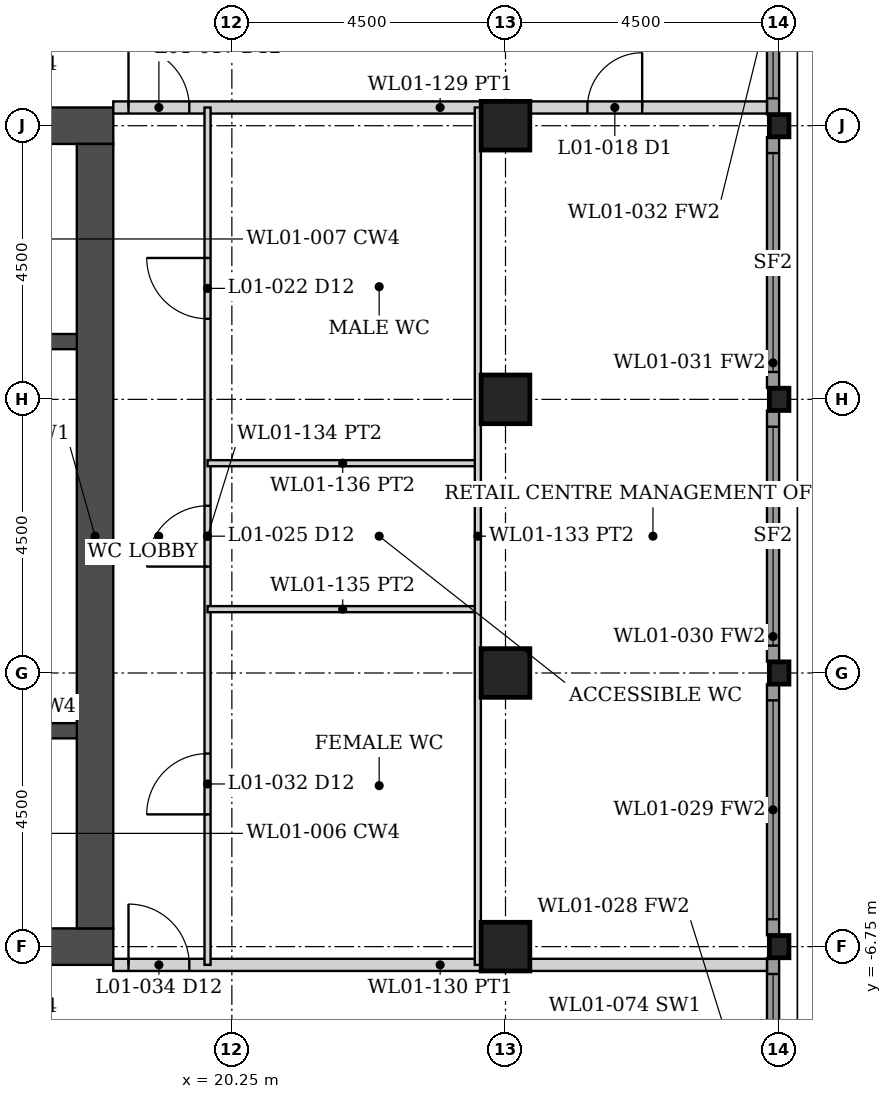
"""IFC4 building model, lengths in metres.
Left out: names, types, materials, properties, quantities, classifications, styles, units other than length and angle.
Written with IfcOpenShell. Run it as: python <this file> out.ifc"""

import sys

from ifc_helpers import new_model, si_unit, direction, frame, frame_2d, origin, origin_2d, place, context, subcontext, project, spatial, rectangle, hollow_rectangle, i_section, extrude, element, fill, save


model = new_model("IFC4")
c1 = context("Model", 3, precision=1e-05, world=origin(), true_north=direction((0.0, 1.0)))
c2 = subcontext(c1, "Body", "Model", "MODEL_VIEW")
j1 = project(units=[si_unit("LENGTHUNIT", "METRE"), si_unit("PLANEANGLEUNIT", "RADIAN")], contexts=[c1])
p1 = place(None, origin())
s1 = spatial("IfcSite", under=j1, at=p1, CompositionType="ELEMENT")
p2 = place(p1, origin())
s2 = spatial("IfcBuilding", under=s1, at=p2, CompositionType="ELEMENT")
p3 = place(p2, frame((0.0, 0.0, 6.0)))
s3 = spatial("IfcBuildingStorey", under=s2, at=p3, CompositionType="ELEMENT", Elevation=6.0)
for number, where, z_axis, x_axis in (
    (1, (24.75, -6.75, 0.0), (0.0, 0.0, 1.0), (1.0, 0.0, 0.0)),
    (2, (24.75, -2.25, 0.0), (0.0, 0.0, 1.0), (1.0, 0.0, 0.0)),
    (3, (24.75, 2.25, 0.0), (0.0, 0.0, 1.0), (1.0, 0.0, 0.0)),
    (4, (24.75, 6.75, 0.0), (0.0, 0.0, 1.0), (1.0, 0.0, 0.0)),
):
    element("IfcColumn", number, at=place(p3, frame(where, z_axis=z_axis, x_axis=x_axis)), inside=s3, PredefinedType="COLUMN", context=c2, shape_type="SweptSolid", body=[
        extrude(hollow_rectangle(XDim=0.8, YDim=0.8, WallThickness=0.08, at=origin_2d()), origin(), (0.0, 0.0, 1.0), 5.0),
    ])
for number, where, z_axis, x_axis in (
    (5, (29.25, -6.75, 0.0), (0.0, 0.0, 1.0), (1.0, 0.0, 0.0)),
    (6, (29.25, -2.25, 0.0), (0.0, 0.0, 1.0), (1.0, 0.0, 0.0)),
    (7, (29.25, 2.25, 0.0), (0.0, 0.0, 1.0), (1.0, 0.0, 0.0)),
    (8, (29.25, 6.75, 0.0), (0.0, 0.0, 1.0), (1.0, 0.0, 0.0)),
):
    element("IfcColumn", number, at=place(p3, frame(where, z_axis=z_axis, x_axis=x_axis)), inside=s3, PredefinedType="COLUMN", context=c2, shape_type="SweptSolid", body=[
        extrude(i_section(OverallWidth=0.322, OverallDepth=0.365, WebThickness=0.027, FlangeThickness=0.044, FilletRadius=0.015, at=origin_2d()), origin(), (0.0, 0.0, 1.0), 5.0),
    ])
for number, where, z_axis, x_axis in (
    (9, (8.7, -6.75, 0.0), (0.0, 0.0, 1.0), (1.0, 0.0, 0.0)),
    (10, (8.7, 6.75, 0.0), (0.0, 0.0, 1.0), (1.0, 0.0, 0.0)),
):
    element("IfcWall", number, at=place(p3, frame(where, z_axis=z_axis, x_axis=x_axis)), inside=s3, PredefinedType="SHEAR", context=c2, shape_type="SweptSolid", body=[
        extrude(rectangle(XDim=9.6, YDim=0.6, at=frame_2d((4.8, 0.0))), origin(), (0.0, 0.0, 1.0), 5.0),
    ])
p4 = place(p3, frame((18.0, -6.45, 0.0), z_axis=(0.0, 0.0, 1.0), x_axis=(0.0, 1.0, 0.0)))
e11 = element("IfcWall", 11, at=p4, inside=s3, PredefinedType="SHEAR", context=c2, shape_type="SweptSolid", body=[
    extrude(rectangle(XDim=12.9, YDim=0.6, at=frame_2d((6.45, 0.0))), origin(), (0.0, 0.0, 1.0), 5.0),
])
p5 = place(p3, frame((9.3, -3.2, 0.0), z_axis=(0.0, 0.0, 1.0), x_axis=(1.0, 0.0, 0.0)))
e12 = element("IfcWall", 12, at=p5, inside=s3, PredefinedType="SHEAR", context=c2, shape_type="SweptSolid", body=[
    extrude(rectangle(XDim=8.4, YDim=0.25, at=frame_2d((4.2, 0.0))), origin(), (0.0, 0.0, 1.0), 5.0),
])
p6 = place(p5, frame((0.15, 0.0, 0.0)))
e13 = element("IfcOpeningElement", 13, at=p6, cuts=e12, PredefinedType="OPENING", context=c2, shape_type="SweptSolid", body=[
    extrude(rectangle(XDim=1.0, YDim=2.1, at=frame_2d((0.5, 1.05))), frame((0.0, 0.135, 0.0), z_axis=(0.0, -1.0, 0.0), x_axis=(1.0, 0.0, 0.0)), (0.0, 0.0, 1.0), 0.27),
])
p7 = place(p3, frame((9.3, 3.2, 0.0), z_axis=(0.0, 0.0, 1.0), x_axis=(1.0, 0.0, 0.0)))
e14 = element("IfcWall", 14, at=p7, inside=s3, PredefinedType="SHEAR", context=c2, shape_type="SweptSolid", body=[
    extrude(rectangle(XDim=8.4, YDim=0.25, at=frame_2d((4.2, 0.0))), origin(), (0.0, 0.0, 1.0), 5.0),
])
p8 = place(p3, frame((29.15, -11.062, 0.0), z_axis=(0.0, 0.0, 1.0), x_axis=(0.0, 1.0, 0.0)))
e15 = element("IfcWall", 15, at=p8, inside=s3, PredefinedType="SOLIDWALL", context=c2, shape_type="SweptSolid", body=[
    extrude(rectangle(XDim=4.125, YDim=0.2, at=frame_2d((2.062, 0.0))), origin(), (0.0, 0.0, 1.0), 4.133),
])
p9 = place(p8, frame((0.262, 0.0, 0.15)))
e16 = element("IfcOpeningElement", 16, at=p9, cuts=e15, PredefinedType="OPENING", context=c2, shape_type="SweptSolid", body=[
    extrude(rectangle(XDim=3.6, YDim=3.833, at=frame_2d((1.8, 1.917))), frame((0.0, 0.11, 0.0), z_axis=(0.0, -1.0, 0.0), x_axis=(1.0, 0.0, 0.0)), (0.0, 0.0, 1.0), 0.22),
])
p10 = place(p3, frame((29.15, -6.562, 0.0), z_axis=(0.0, 0.0, 1.0), x_axis=(0.0, 1.0, 0.0)))
e17 = element("IfcWall", 17, at=p10, inside=s3, PredefinedType="SOLIDWALL", context=c2, shape_type="SweptSolid", body=[
    extrude(rectangle(XDim=4.125, YDim=0.2, at=frame_2d((2.062, 0.0))), origin(), (0.0, 0.0, 1.0), 4.133),
])
p11 = place(p10, frame((0.262, 0.0, 0.15)))
e18 = element("IfcOpeningElement", 18, at=p11, cuts=e17, PredefinedType="OPENING", context=c2, shape_type="SweptSolid", body=[
    extrude(rectangle(XDim=3.6, YDim=3.833, at=frame_2d((1.8, 1.917))), frame((0.0, 0.11, 0.0), z_axis=(0.0, -1.0, 0.0), x_axis=(1.0, 0.0, 0.0)), (0.0, 0.0, 1.0), 0.22),
])
p12 = place(p3, frame((29.15, -2.062, 0.0), z_axis=(0.0, 0.0, 1.0), x_axis=(0.0, 1.0, 0.0)))
e19 = element("IfcWall", 19, at=p12, inside=s3, PredefinedType="SOLIDWALL", context=c2, shape_type="SweptSolid", body=[
    extrude(rectangle(XDim=4.125, YDim=0.2, at=frame_2d((2.062, 0.0))), origin(), (0.0, 0.0, 1.0), 4.133),
])
p13 = place(p12, frame((0.262, 0.0, 0.15)))
e20 = element("IfcOpeningElement", 20, at=p13, cuts=e19, PredefinedType="OPENING", context=c2, shape_type="SweptSolid", body=[
    extrude(rectangle(XDim=3.6, YDim=3.833, at=frame_2d((1.8, 1.917))), frame((0.0, 0.11, 0.0), z_axis=(0.0, -1.0, 0.0), x_axis=(1.0, 0.0, 0.0)), (0.0, 0.0, 1.0), 0.22),
])
p14 = place(p3, frame((29.15, 2.438, 0.0), z_axis=(0.0, 0.0, 1.0), x_axis=(0.0, 1.0, 0.0)))
e21 = element("IfcWall", 21, at=p14, inside=s3, PredefinedType="SOLIDWALL", context=c2, shape_type="SweptSolid", body=[
    extrude(rectangle(XDim=4.125, YDim=0.2, at=frame_2d((2.062, 0.0))), origin(), (0.0, 0.0, 1.0), 4.133),
])
p15 = place(p14, frame((0.262, 0.0, 0.15)))
e22 = element("IfcOpeningElement", 22, at=p15, cuts=e21, PredefinedType="OPENING", context=c2, shape_type="SweptSolid", body=[
    extrude(rectangle(XDim=3.6, YDim=3.833, at=frame_2d((1.8, 1.917))), frame((0.0, 0.11, 0.0), z_axis=(0.0, -1.0, 0.0), x_axis=(1.0, 0.0, 0.0)), (0.0, 0.0, 1.0), 0.22),
])
p16 = place(p3, frame((29.15, 6.938, 0.0), z_axis=(0.0, 0.0, 1.0), x_axis=(0.0, 1.0, 0.0)))
e23 = element("IfcWall", 23, at=p16, inside=s3, PredefinedType="SOLIDWALL", context=c2, shape_type="SweptSolid", body=[
    extrude(rectangle(XDim=4.125, YDim=0.2, at=frame_2d((2.062, 0.0))), origin(), (0.0, 0.0, 1.0), 4.133),
])
p17 = place(p16, frame((0.262, 0.0, 0.15)))
e24 = element("IfcOpeningElement", 24, at=p17, cuts=e23, PredefinedType="OPENING", context=c2, shape_type="SweptSolid", body=[
    extrude(rectangle(XDim=3.6, YDim=3.833, at=frame_2d((1.8, 1.917))), frame((0.0, 0.11, 0.0), z_axis=(0.0, -1.0, 0.0), x_axis=(1.0, 0.0, 0.0)), (0.0, 0.0, 1.0), 0.22),
])
p18 = place(p3, frame((18.3, 7.05, 0.0), z_axis=(0.0, 0.0, 1.0), x_axis=(1.0, 0.0, 0.0)))
e25 = element("IfcWall", 25, at=p18, inside=s3, PredefinedType="PARTITIONING", context=c2, shape_type="SweptSolid", body=[
    extrude(rectangle(XDim=10.75, YDim=0.2, at=frame_2d((5.375, 0.0))), origin(), (0.0, 0.0, 1.0), 3.829),
])
p19 = place(p18, frame((7.798, 0.0, 0.0)))
e26 = element("IfcOpeningElement", 26, at=p19, cuts=e25, PredefinedType="OPENING", context=c2, shape_type="SweptSolid", body=[
    extrude(rectangle(XDim=0.9, YDim=2.1, at=frame_2d((0.45, 1.05))), frame((0.0, 0.11, 0.0), z_axis=(0.0, -1.0, 0.0), x_axis=(1.0, 0.0, 0.0)), (0.0, 0.0, 1.0), 0.22),
])
p20 = place(p18, frame((0.25, 0.0, 0.0)))
e27 = element("IfcOpeningElement", 27, at=p20, cuts=e25, PredefinedType="OPENING", context=c2, shape_type="SweptSolid", body=[
    extrude(rectangle(XDim=1.0, YDim=2.1, at=frame_2d((0.5, 1.05))), frame((0.0, 0.11, 0.0), z_axis=(0.0, -1.0, 0.0), x_axis=(1.0, 0.0, 0.0)), (0.0, 0.0, 1.0), 0.22),
])
p21 = place(p3, frame((18.3, -7.05, 0.0), z_axis=(0.0, 0.0, 1.0), x_axis=(1.0, 0.0, 0.0)))
e28 = element("IfcWall", 28, at=p21, inside=s3, PredefinedType="PARTITIONING", context=c2, shape_type="SweptSolid", body=[
    extrude(rectangle(XDim=10.75, YDim=0.2, at=frame_2d((5.375, 0.0))), origin(), (0.0, 0.0, 1.0), 3.829),
])
p22 = place(p21, frame((0.25, 0.0, 0.0)))
e29 = element("IfcOpeningElement", 29, at=p22, cuts=e28, PredefinedType="OPENING", context=c2, shape_type="SweptSolid", body=[
    extrude(rectangle(XDim=1.0, YDim=2.1, at=frame_2d((0.5, 1.05))), frame((0.0, 0.11, 0.0), z_axis=(0.0, -1.0, 0.0), x_axis=(1.0, 0.0, 0.0)), (0.0, 0.0, 1.0), 0.22),
])
p23 = place(p3, frame((19.85, -7.05, 0.0), z_axis=(0.0, 0.0, 1.0), x_axis=(0.0, 1.0, 0.0)))
e30 = element("IfcWall", 30, at=p23, inside=s3, PredefinedType="PARTITIONING", context=c2, shape_type="SweptSolid", body=[
    extrude(rectangle(XDim=14.1, YDim=0.1, at=frame_2d((7.05, 0.0))), origin(), (0.0, 0.0, 1.0), 3.829),
])
p24 = place(p23, frame((2.475, 0.0, 0.0)))
e31 = element("IfcOpeningElement", 31, at=p24, cuts=e30, PredefinedType="OPENING", context=c2, shape_type="SweptSolid", body=[
    extrude(rectangle(XDim=1.0, YDim=2.1, at=frame_2d((0.5, 1.05))), frame((0.0, 0.06, 0.0), z_axis=(0.0, -1.0, 0.0), x_axis=(1.0, 0.0, 0.0)), (0.0, 0.0, 1.0), 0.12),
])
p25 = place(p23, frame((6.55, 0.0, 0.0)))
e32 = element("IfcOpeningElement", 32, at=p25, cuts=e30, PredefinedType="OPENING", context=c2, shape_type="SweptSolid", body=[
    extrude(rectangle(XDim=1.0, YDim=2.1, at=frame_2d((0.5, 1.05))), frame((0.0, 0.06, 0.0), z_axis=(0.0, -1.0, 0.0), x_axis=(1.0, 0.0, 0.0)), (0.0, 0.0, 1.0), 0.12),
])
p26 = place(p23, frame((10.625, 0.0, 0.0)))
e33 = element("IfcOpeningElement", 33, at=p26, cuts=e30, PredefinedType="OPENING", context=c2, shape_type="SweptSolid", body=[
    extrude(rectangle(XDim=1.0, YDim=2.1, at=frame_2d((0.5, 1.05))), frame((0.0, 0.06, 0.0), z_axis=(0.0, -1.0, 0.0), x_axis=(1.0, 0.0, 0.0)), (0.0, 0.0, 1.0), 0.12),
])
for number, where, z_axis, x_axis in (
    (34, (19.85, -1.2, 0.0), (0.0, 0.0, 1.0), (1.0, 0.0, 0.0)),
    (35, (19.85, 1.2, 0.0), (0.0, 0.0, 1.0), (1.0, 0.0, 0.0)),
):
    element("IfcWall", number, at=place(p3, frame(where, z_axis=z_axis, x_axis=x_axis)), inside=s3, PredefinedType="PARTITIONING", context=c2, shape_type="SweptSolid", body=[
        extrude(rectangle(XDim=4.445, YDim=0.1, at=frame_2d((2.222, 0.0))), origin(), (0.0, 0.0, 1.0), 3.829),
    ])
p27 = place(p3, frame((24.295, -7.05, 0.0), z_axis=(0.0, 0.0, 1.0), x_axis=(0.0, 1.0, 0.0)))
e36 = element("IfcWall", 36, at=p27, inside=s3, PredefinedType="PARTITIONING", context=c2, shape_type="SweptSolid", body=[
    extrude(rectangle(XDim=14.1, YDim=0.1, at=frame_2d((7.05, 0.0))), origin(), (0.0, 0.0, 1.0), 3.829),
])
p28 = place(p9, origin())
e37 = element("IfcWindow", 37, at=p28, inside=s3, PartitioningType="SINGLE_PANEL", PredefinedType="WINDOW", context=c2, shape_type="SweptSolid", body=[
    extrude(rectangle(XDim=3.6, YDim=3.833, at=frame_2d((1.8, 1.917))), frame((0.0, 0.03, 0.0), z_axis=(0.0, -1.0, 0.0), x_axis=(1.0, 0.0, 0.0)), (0.0, 0.0, 1.0), 0.06),
])
fill(e16, e37)
p29 = place(p11, origin())
e38 = element("IfcWindow", 38, at=p29, inside=s3, PartitioningType="SINGLE_PANEL", PredefinedType="WINDOW", context=c2, shape_type="SweptSolid", body=[
    extrude(rectangle(XDim=3.6, YDim=3.833, at=frame_2d((1.8, 1.917))), frame((0.0, 0.03, 0.0), z_axis=(0.0, -1.0, 0.0), x_axis=(1.0, 0.0, 0.0)), (0.0, 0.0, 1.0), 0.06),
])
fill(e18, e38)
p30 = place(p13, origin())
e39 = element("IfcWindow", 39, at=p30, inside=s3, PartitioningType="SINGLE_PANEL", PredefinedType="WINDOW", context=c2, shape_type="SweptSolid", body=[
    extrude(rectangle(XDim=3.6, YDim=3.833, at=frame_2d((1.8, 1.917))), frame((0.0, 0.03, 0.0), z_axis=(0.0, -1.0, 0.0), x_axis=(1.0, 0.0, 0.0)), (0.0, 0.0, 1.0), 0.06),
])
fill(e20, e39)
p31 = place(p15, origin())
e40 = element("IfcWindow", 40, at=p31, inside=s3, PartitioningType="SINGLE_PANEL", PredefinedType="WINDOW", context=c2, shape_type="SweptSolid", body=[
    extrude(rectangle(XDim=3.6, YDim=3.833, at=frame_2d((1.8, 1.917))), frame((0.0, 0.03, 0.0), z_axis=(0.0, -1.0, 0.0), x_axis=(1.0, 0.0, 0.0)), (0.0, 0.0, 1.0), 0.06),
])
fill(e22, e40)
p32 = place(p17, origin())
e41 = element("IfcWindow", 41, at=p32, inside=s3, PartitioningType="SINGLE_PANEL", PredefinedType="WINDOW", context=c2, shape_type="SweptSolid", body=[
    extrude(rectangle(XDim=3.6, YDim=3.833, at=frame_2d((1.8, 1.917))), frame((0.0, 0.03, 0.0), z_axis=(0.0, -1.0, 0.0), x_axis=(1.0, 0.0, 0.0)), (0.0, 0.0, 1.0), 0.06),
])
fill(e24, e41)
p33 = place(p24, origin())
e42 = element("IfcDoor", 42, at=p33, inside=s3, OperationType="SINGLE_SWING_LEFT", PredefinedType="DOOR", context=c2, shape_type="SweptSolid", body=[
    extrude(rectangle(XDim=1.0, YDim=2.1, at=frame_2d((0.5, 1.05))), frame((0.0, 0.025, 0.0), z_axis=(0.0, -1.0, 0.0), x_axis=(1.0, 0.0, 0.0)), (0.0, 0.0, 1.0), 0.05),
])
fill(e31, e42)
p34 = place(p25, origin())
e43 = element("IfcDoor", 43, at=p34, inside=s3, OperationType="SINGLE_SWING_LEFT", PredefinedType="DOOR", context=c2, shape_type="SweptSolid", body=[
    extrude(rectangle(XDim=1.0, YDim=2.1, at=frame_2d((0.5, 1.05))), frame((0.0, 0.025, 0.0), z_axis=(0.0, -1.0, 0.0), x_axis=(1.0, 0.0, 0.0)), (0.0, 0.0, 1.0), 0.05),
])
fill(e32, e43)
p35 = place(p26, origin())
e44 = element("IfcDoor", 44, at=p35, inside=s3, OperationType="SINGLE_SWING_RIGHT", PredefinedType="DOOR", context=c2, shape_type="SweptSolid", body=[
    extrude(rectangle(XDim=1.0, YDim=2.1, at=frame_2d((0.5, 1.05))), frame((0.0, 0.025, 0.0), z_axis=(0.0, -1.0, 0.0), x_axis=(1.0, 0.0, 0.0)), (0.0, 0.0, 1.0), 0.05),
])
fill(e33, e44)
p36 = place(p19, origin())
e45 = element("IfcDoor", 45, at=p36, inside=s3, OperationType="SINGLE_SWING_RIGHT", PredefinedType="DOOR", context=c2, shape_type="SweptSolid", body=[
    extrude(rectangle(XDim=0.9, YDim=2.1, at=frame_2d((0.45, 1.05))), frame((0.0, 0.025, 0.0), z_axis=(0.0, -1.0, 0.0), x_axis=(1.0, 0.0, 0.0)), (0.0, 0.0, 1.0), 0.05),
])
fill(e26, e45)
p37 = place(p20, origin())
e46 = element("IfcDoor", 46, at=p37, inside=s3, OperationType="SINGLE_SWING_LEFT", PredefinedType="DOOR", context=c2, shape_type="SweptSolid", body=[
    extrude(rectangle(XDim=1.0, YDim=2.1, at=frame_2d((0.5, 1.05))), frame((0.0, 0.025, 0.0), z_axis=(0.0, -1.0, 0.0), x_axis=(1.0, 0.0, 0.0)), (0.0, 0.0, 1.0), 0.05),
])
fill(e27, e46)
p38 = place(p22, origin())
e47 = element("IfcDoor", 47, at=p38, inside=s3, OperationType="SINGLE_SWING_LEFT", PredefinedType="DOOR", context=c2, shape_type="SweptSolid", body=[
    extrude(rectangle(XDim=1.0, YDim=2.1, at=frame_2d((0.5, 1.05))), frame((0.0, 0.025, 0.0), z_axis=(0.0, -1.0, 0.0), x_axis=(1.0, 0.0, 0.0)), (0.0, 0.0, 1.0), 0.05),
])
fill(e29, e47)
save(model, sys.argv[1])
